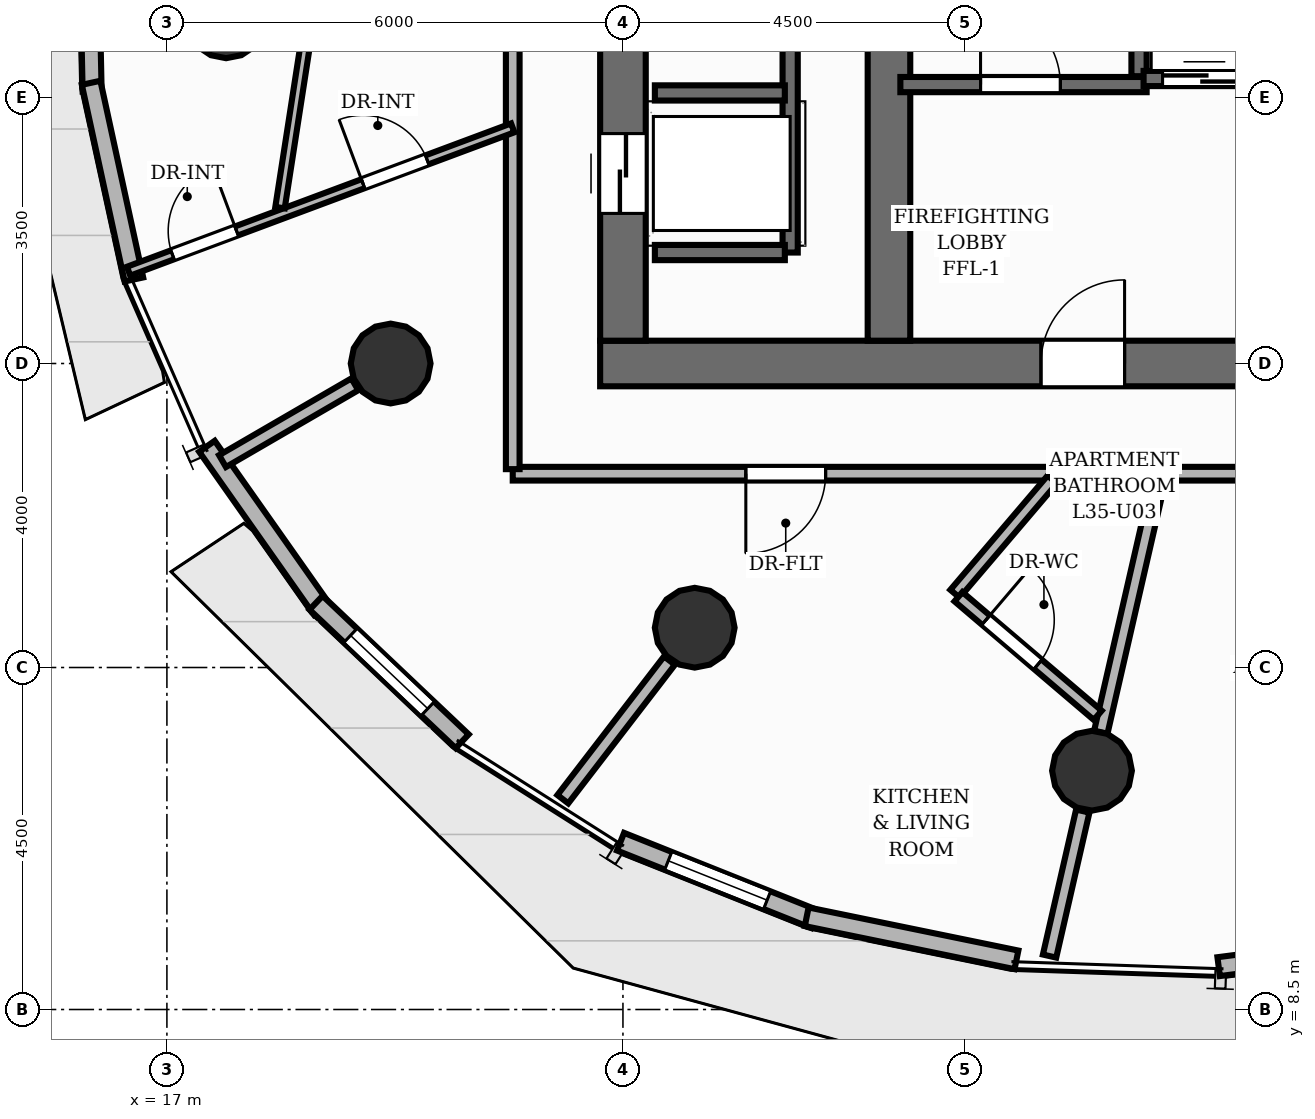
"""IFC4 building model, lengths in metres.
Left out: names, types, materials, properties, quantities, classifications, styles, units other than length and angle.
Written with IfcOpenShell. Run it as: python <this file> out.ifc"""

import sys

from ifc_helpers import new_model, si_unit, direction, frame, frame_2d, origin, origin_2d, place, context, subcontext, project, spatial, rectangle, circle, extrude, element, fill, save


model = new_model("IFC4")
c1 = context("Model", 3, precision=1e-05, world=origin(), true_north=direction((0.0, 1.0)))
c2 = subcontext(c1, "Body", "Model", "MODEL_VIEW")
j1 = project(units=[si_unit("LENGTHUNIT", "METRE"), si_unit("PLANEANGLEUNIT", "RADIAN")], contexts=[c1])
p1 = place(None, origin())
s1 = spatial("IfcSite", under=j1, at=p1, CompositionType="ELEMENT")
p2 = place(p1, origin())
s2 = spatial("IfcBuilding", under=s1, at=p2, CompositionType="ELEMENT")
p3 = place(p2, frame((0.0, 0.0, 120.16)))
s3 = spatial("IfcBuildingStorey", under=s2, at=p3, CompositionType="ELEMENT", Elevation=120.16)
p4 = place(p3, frame((22.7, 17.0, 0.0), z_axis=(0.0, 0.0, 1.0), x_axis=(1.0, 0.0, 0.0)))
e1 = element("IfcWall", 1, at=p4, inside=s3, PredefinedType="SHEAR", context=c2, shape_type="SweptSolid", body=[
    extrude(rectangle(XDim=18.6, YDim=0.6, at=frame_2d((9.3, 0.0))), origin(), (0.0, 0.0, 1.0), 3.2),
])
p5 = place(p4, frame((5.8, 0.0, 0.0)))
e2 = element("IfcOpeningElement", 2, at=p5, cuts=e1, PredefinedType="OPENING", context=c2, shape_type="SweptSolid", body=[
    extrude(rectangle(XDim=1.1, YDim=2.15, at=frame_2d((0.55, 1.075))), frame((0.0, 0.31, 0.0), z_axis=(0.0, -1.0, 0.0), x_axis=(1.0, 0.0, 0.0)), (0.0, 0.0, 1.0), 0.62),
])
p6 = place(p4, frame((9.35, 0.0, 0.0)))
e3 = element("IfcOpeningElement", 3, at=p6, cuts=e1, PredefinedType="OPENING", context=c2, shape_type="SweptSolid", body=[
    extrude(rectangle(XDim=0.9, YDim=2.1, at=frame_2d((0.45, 1.05))), frame((0.0, 0.31, 0.0), z_axis=(0.0, -1.0, 0.0), x_axis=(1.0, 0.0, 0.0)), (0.0, 0.0, 1.0), 0.62),
])
p7 = place(p3, frame((23.0, 17.3, 0.0), z_axis=(0.0, 0.0, 1.0), x_axis=(0.0, 1.0, 0.0)))
e4 = element("IfcWall", 4, at=p7, inside=s3, PredefinedType="SHEAR", context=c2, shape_type="SweptSolid", body=[
    extrude(rectangle(XDim=13.4, YDim=0.6, at=frame_2d((6.7, 0.0))), origin(), (0.0, 0.0, 1.0), 3.2),
])
p8 = place(p7, frame((1.675, 0.0, 0.0)))
e5 = element("IfcOpeningElement", 5, at=p8, cuts=e4, PredefinedType="OPENING", context=c2, shape_type="SweptSolid", body=[
    extrude(rectangle(XDim=1.05, YDim=2.15, at=frame_2d((0.525, 1.075))), frame((0.0, 0.31, 0.0), z_axis=(0.0, -1.0, 0.0), x_axis=(1.0, 0.0, 0.0)), (0.0, 0.0, 1.0), 0.62),
])
p9 = place(p7, frame((6.175, 0.0, 0.0)))
e6 = element("IfcOpeningElement", 6, at=p9, cuts=e4, PredefinedType="OPENING", context=c2, shape_type="SweptSolid", body=[
    extrude(rectangle(XDim=1.05, YDim=2.15, at=frame_2d((0.525, 1.075))), frame((0.0, 0.31, 0.0), z_axis=(0.0, -1.0, 0.0), x_axis=(1.0, 0.0, 0.0)), (0.0, 0.0, 1.0), 0.62),
])
p10 = place(p7, frame((10.675, 0.0, 0.0)))
e7 = element("IfcOpeningElement", 7, at=p10, cuts=e4, PredefinedType="OPENING", context=c2, shape_type="SweptSolid", body=[
    extrude(rectangle(XDim=1.05, YDim=2.15, at=frame_2d((0.525, 1.075))), frame((0.0, 0.31, 0.0), z_axis=(0.0, -1.0, 0.0), x_axis=(1.0, 0.0, 0.0)), (0.0, 0.0, 1.0), 0.62),
])
p11 = place(p3, frame((26.5, 17.3, 0.0), z_axis=(0.0, 0.0, 1.0), x_axis=(0.0, 1.0, 0.0)))
e8 = element("IfcWall", 8, at=p11, inside=s3, PredefinedType="SHEAR", context=c2, shape_type="SweptSolid", body=[
    extrude(rectangle(XDim=13.4, YDim=0.56, at=frame_2d((6.7, 0.0))), origin(), (0.0, 0.0, 1.0), 3.2),
])
for number, where, z_axis, x_axis in (
    (9, (17.779, 21.542, 0.0), (0.0, 0.0, 1.0), (1.0, 0.0, 0.0)),
    (10, (19.944, 17.0, 0.0), (0.0, 0.0, 1.0), (1.0, 0.0, 0.0)),
    (11, (23.944, 13.523, 0.0), (0.0, 0.0, 1.0), (1.0, 0.0, 0.0)),
    (12, (29.171, 11.642, 0.0), (0.0, 0.0, 1.0), (1.0, 0.0, 0.0)),
):
    element("IfcColumn", number, at=place(p3, frame(where, z_axis=z_axis, x_axis=x_axis)), inside=s3, PredefinedType="COLUMN", context=c2, shape_type="SweptSolid", body=[
        extrude(circle(Radius=0.525, at=origin_2d()), origin(), (0.0, 0.0, 1.0), 3.2),
    ])
p12 = place(p3, frame((16.016, 20.581, 0.0), z_axis=(0.0, 0.0, 1.0), x_axis=(-0.020851468483, 0.999782584496, 0.0)))
e13 = element("IfcWall", 13, at=p12, inside=s3, PredefinedType="SOLIDWALL", context=c2, shape_type="SweptSolid", body=[
    extrude(rectangle(XDim=2.693, YDim=0.25, at=frame_2d((1.346, 0.0))), origin(), (0.0, 0.0, 1.0), 2.96),
])
p13 = place(p3, frame((16.566, 18.106, 0.0), z_axis=(0.0, 0.0, 1.0), x_axis=(-0.212506194302, 0.977159719485, 0.0)))
e14 = element("IfcWall", 14, at=p13, inside=s3, PredefinedType="SOLIDWALL", context=c2, shape_type="SweptSolid", body=[
    extrude(rectangle(XDim=2.648, YDim=0.25, at=frame_2d((1.324, 0.0))), origin(), (0.0, 0.0, 1.0), 2.96),
])
p14 = place(p3, frame((19.038, 13.765, 0.0), z_axis=(0.0, 0.0, 1.0), x_axis=(-0.575627066149, 0.817712345949, 0.0)))
e15 = element("IfcWall", 15, at=p14, inside=s3, PredefinedType="SOLIDWALL", context=c2, shape_type="SweptSolid", body=[
    extrude(rectangle(XDim=2.624, YDim=0.25, at=frame_2d((1.312, 0.0))), origin(), (0.0, 0.0, 1.0), 2.96),
])
p15 = place(p3, frame((20.885, 12.03, 0.0), z_axis=(0.0, 0.0, 1.0), x_axis=(-0.725707968309, 0.688002866805, 0.0)))
e16 = element("IfcWall", 16, at=p15, inside=s3, PredefinedType="SOLIDWALL", context=c2, shape_type="SweptSolid", body=[
    extrude(rectangle(XDim=2.648, YDim=0.25, at=frame_2d((1.324, 0.0))), origin(), (0.0, 0.0, 1.0), 2.96),
])
p16 = place(p15, frame((0.624, 0.0, 0.85)))
e17 = element("IfcOpeningElement", 17, at=p16, cuts=e16, PredefinedType="OPENING", context=c2, shape_type="SweptSolid", body=[
    extrude(rectangle(XDim=1.4, YDim=1.55, at=frame_2d((0.7, 0.775))), frame((0.0, 0.135, 0.0), z_axis=(0.0, -1.0, 0.0), x_axis=(1.0, 0.0, 0.0)), (0.0, 0.0, 1.0), 0.27),
])
p17 = place(p3, frame((25.524, 9.688, 0.0), z_axis=(0.0, 0.0, 1.0), x_axis=(-0.928770081868, 0.370656357058, 0.0)))
e18 = element("IfcWall", 18, at=p17, inside=s3, PredefinedType="SOLIDWALL", context=c2, shape_type="SweptSolid", body=[
    extrude(rectangle(XDim=2.752, YDim=0.25, at=frame_2d((1.376, 0.0))), origin(), (0.0, 0.0, 1.0), 2.96),
])
p18 = place(p17, frame((0.676, 0.0, 0.85)))
e19 = element("IfcOpeningElement", 19, at=p18, cuts=e18, PredefinedType="OPENING", context=c2, shape_type="SweptSolid", body=[
    extrude(rectangle(XDim=1.4, YDim=1.55, at=frame_2d((0.7, 0.775))), frame((0.0, 0.135, 0.0), z_axis=(0.0, -1.0, 0.0), x_axis=(1.0, 0.0, 0.0)), (0.0, 0.0, 1.0), 0.27),
])
p19 = place(p3, frame((28.177, 9.153, 0.0), z_axis=(0.0, 0.0, 1.0), x_axis=(-0.97955106245, 0.20119571579, 0.0)))
e20 = element("IfcWall", 20, at=p19, inside=s3, PredefinedType="SOLIDWALL", context=c2, shape_type="SweptSolid", body=[
    extrude(rectangle(XDim=2.818, YDim=0.25, at=frame_2d((1.409, 0.0))), origin(), (0.0, 0.0, 1.0), 2.96),
])
p20 = place(p3, frame((33.75, 9.439, 0.0), z_axis=(0.0, 0.0, 1.0), x_axis=(-0.991825107288, -0.1276046886, 0.0)))
e21 = element("IfcWall", 21, at=p20, inside=s3, PredefinedType="SOLIDWALL", context=c2, shape_type="SweptSolid", body=[
    extrude(rectangle(XDim=2.937, YDim=0.25, at=frame_2d((1.468, 0.0))), origin(), (0.0, 0.0, 1.0), 2.96),
])
p21 = place(p3, frame((29.79, 20.78, 0.0), z_axis=(0.0, 0.0, 1.0), x_axis=(0.0, 1.0, 0.0)))
e22 = element("IfcWall", 22, at=p21, inside=s3, PredefinedType="SHEAR", context=c2, shape_type="SweptSolid", body=[
    extrude(rectangle(XDim=6.44, YDim=0.2, at=frame_2d((3.22, 0.0))), origin(), (0.0, 0.0, 1.0), 3.2),
])
p22 = place(p3, frame((26.65, 20.67, 0.0), z_axis=(0.0, 0.0, 1.0), x_axis=(1.0, 0.0, 0.0)))
e23 = element("IfcWall", 23, at=p22, inside=s3, PredefinedType="SHEAR", context=c2, shape_type="SweptSolid", body=[
    extrude(rectangle(XDim=3.24, YDim=0.2, at=frame_2d((1.62, 0.0))), origin(), (0.0, 0.0, 1.0), 3.2),
])
p23 = place(p22, frame((1.055, 0.0, 0.0)))
e24 = element("IfcOpeningElement", 24, at=p23, cuts=e23, PredefinedType="OPENING", context=c2, shape_type="SweptSolid", body=[
    extrude(rectangle(XDim=1.05, YDim=2.15, at=frame_2d((0.525, 1.075))), frame((0.0, 0.11, 0.0), z_axis=(0.0, -1.0, 0.0), x_axis=(1.0, 0.0, 0.0)), (0.0, 0.0, 1.0), 0.22),
])
p24 = place(p3, frame((29.85, 20.75, 0.0), z_axis=(0.0, 0.0, 1.0), x_axis=(1.0, 0.0, 0.0)))
e25 = element("IfcWall", 25, at=p24, inside=s3, PredefinedType="SHEAR", context=c2, shape_type="SweptSolid", body=[
    extrude(rectangle(XDim=2.3, YDim=0.2, at=frame_2d((1.15, 0.0))), origin(), (0.0, 0.0, 1.0), 3.2),
])
p25 = place(p24, frame((0.25, 0.0, 0.0)))
e26 = element("IfcOpeningElement", 26, at=p25, cuts=e25, PredefinedType="OPENING", context=c2, shape_type="SweptSolid", body=[
    extrude(rectangle(XDim=1.1, YDim=2.15, at=frame_2d((0.55, 1.075))), frame((0.0, 0.11, 0.0), z_axis=(0.0, -1.0, 0.0), x_axis=(1.0, 0.0, 0.0)), (0.0, 0.0, 1.0), 0.22),
])
p26 = place(p3, frame((25.2, 18.46, 0.0), z_axis=(0.0, 0.0, 1.0), x_axis=(0.0, 1.0, 0.0)))
e27 = element("IfcWall", 27, at=p26, inside=s3, PredefinedType="SHEAR", context=c2, shape_type="SweptSolid", body=[
    extrude(rectangle(XDim=11.08, YDim=0.2, at=frame_2d((5.54, 0.0))), origin(), (0.0, 0.0, 1.0), 3.2),
])
for number, where, z_axis, x_axis in (
    (28, (23.42, 18.46, 0.0), (0.0, 0.0, 1.0), (1.0, 0.0, 0.0)),
    (29, (23.42, 20.56, 0.0), (0.0, 0.0, 1.0), (1.0, 0.0, 0.0)),
):
    element("IfcWall", number, at=place(p3, frame(where, z_axis=z_axis, x_axis=x_axis)), inside=s3, PredefinedType="SHEAR", context=c2, shape_type="SweptSolid", body=[
        extrude(rectangle(XDim=1.71, YDim=0.2, at=frame_2d((0.855, 0.0))), origin(), (0.0, 0.0, 1.0), 3.2),
    ])
p27 = place(p3, frame((19.472, 16.726, 0.0), z_axis=(0.0, 0.0, 1.0), x_axis=(-0.864841613648, -0.502044802088, 0.0)))
e30 = element("IfcWall", 30, at=p27, inside=s3, PredefinedType="PARTITIONING", context=c2, shape_type="SweptSolid", body=[
    extrude(rectangle(XDim=2.013, YDim=0.18, at=frame_2d((1.006, 0.0))), origin(), (0.0, 0.0, 1.0), 2.336),
])
p28 = place(p3, frame((23.612, 13.092, 0.0), z_axis=(0.0, 0.0, 1.0), x_axis=(-0.609546695458, -0.792750166229, 0.0)))
e31 = element("IfcWall", 31, at=p28, inside=s3, PredefinedType="PARTITIONING", context=c2, shape_type="SweptSolid", body=[
    extrude(rectangle(XDim=2.302, YDim=0.18, at=frame_2d((1.151, 0.0))), origin(), (0.0, 0.0, 1.0), 2.336),
])
p29 = place(p3, frame((29.05, 11.111, 0.0), z_axis=(0.0, 0.0, 1.0), x_axis=(-0.22314653936, -0.97478491062, 0.0)))
e32 = element("IfcWall", 32, at=p29, inside=s3, PredefinedType="PARTITIONING", context=c2, shape_type="SweptSolid", body=[
    extrude(rectangle(XDim=1.957, YDim=0.18, at=frame_2d((0.979, 0.0))), origin(), (0.0, 0.0, 1.0), 2.336),
])
p30 = place(p3, frame((42.45, 15.55, 0.0), z_axis=(0.0, 0.0, 1.0), x_axis=(-1.0, 0.0, 0.0)))
e33 = element("IfcWall", 33, at=p30, inside=s3, PredefinedType="PARTITIONING", context=c2, shape_type="SweptSolid", body=[
    extrude(rectangle(XDim=13.76, YDim=0.18, at=frame_2d((6.88, 0.0))), origin(), (0.0, 0.0, 1.0), 2.955),
])
p31 = place(p30, frame((5.677, 0.0, 0.0)))
e34 = element("IfcOpeningElement", 34, at=p31, cuts=e33, PredefinedType="OPENING", context=c2, shape_type="SweptSolid", body=[
    extrude(rectangle(XDim=1.05, YDim=2.15, at=frame_2d((0.525, 1.075))), frame((0.0, 0.1, 0.0), z_axis=(0.0, -1.0, 0.0), x_axis=(1.0, 0.0, 0.0)), (0.0, 0.0, 1.0), 0.2),
])
p32 = place(p3, frame((28.733, 15.55, 0.0), z_axis=(0.0, 0.0, 1.0), x_axis=(-1.0, 0.0, 0.0)))
e35 = element("IfcWall", 35, at=p32, inside=s3, PredefinedType="PARTITIONING", context=c2, shape_type="SweptSolid", body=[
    extrude(rectangle(XDim=7.183, YDim=0.18, at=frame_2d((3.592, 0.0))), origin(), (0.0, 0.0, 1.0), 2.955),
])
p33 = place(p32, frame((3.067, 0.0, 0.0)))
e36 = element("IfcOpeningElement", 36, at=p33, cuts=e35, PredefinedType="OPENING", context=c2, shape_type="SweptSolid", body=[
    extrude(rectangle(XDim=1.05, YDim=2.15, at=frame_2d((0.525, 1.075))), frame((0.0, 0.1, 0.0), z_axis=(0.0, -1.0, 0.0), x_axis=(1.0, 0.0, 0.0)), (0.0, 0.0, 1.0), 0.2),
])
p34 = place(p3, frame((21.55, 15.61, 0.0), z_axis=(0.0, 0.0, 1.0), x_axis=(0.0, 1.0, 0.0)))
e37 = element("IfcWall", 37, at=p34, inside=s3, PredefinedType="PARTITIONING", context=c2, shape_type="SweptSolid", body=[
    extrude(rectangle(XDim=16.84, YDim=0.18, at=frame_2d((8.42, 0.0))), origin(), (0.0, 0.0, 1.0), 2.955),
])
p35 = place(p3, frame((29.287, 12.149, 0.0), z_axis=(0.0, 0.0, 1.0), x_axis=(0.223423247062, 0.974721525705, 0.0)))
e38 = element("IfcWall", 38, at=p35, inside=s3, PredefinedType="PARTITIONING", context=c2, shape_type="SweptSolid", body=[
    extrude(rectangle(XDim=3.489, YDim=0.18, at=frame_2d((1.745, 0.0))), origin(), (0.0, 0.0, 1.0), 2.336),
])
p36 = place(p3, frame((28.649, 15.474, 0.0), z_axis=(0.0, 0.0, 1.0), x_axis=(-0.64821168269, -0.761460185712, 0.0)))
e39 = element("IfcWall", 39, at=p36, inside=s3, PredefinedType="PLUMBINGWALL", context=c2, shape_type="SweptSolid", body=[
    extrude(rectangle(XDim=1.975, YDim=0.16, at=frame_2d((0.987, 0.0))), origin(), (0.0, 0.0, 1.0), 2.692),
])
p37 = place(p3, frame((27.414, 13.931, 0.0), z_axis=(0.0, 0.0, 1.0), x_axis=(0.761436059215, -0.648240023237, 0.0)))
e40 = element("IfcWall", 40, at=p37, inside=s3, PredefinedType="PLUMBINGWALL", context=c2, shape_type="SweptSolid", body=[
    extrude(rectangle(XDim=2.407, YDim=0.16, at=frame_2d((1.204, 0.0))), origin(), (0.0, 0.0, 1.0), 2.955),
])
p38 = place(p37, frame((0.473, 0.0, 0.0)))
e41 = element("IfcOpeningElement", 41, at=p38, cuts=e40, PredefinedType="OPENING", context=c2, shape_type="SweptSolid", body=[
    extrude(rectangle(XDim=0.9, YDim=2.1, at=frame_2d((0.45, 1.05))), frame((0.0, 0.09, 0.0), z_axis=(0.0, -1.0, 0.0), x_axis=(1.0, 0.0, 0.0)), (0.0, 0.0, 1.0), 0.18),
])
p39 = place(p3, frame((16.496, 18.214, 0.0), z_axis=(0.0, 0.0, 1.0), x_axis=(0.936891530049, 0.349620166641, 0.0)))
e42 = element("IfcWall", 42, at=p39, inside=s3, PredefinedType="PARTITIONING", context=c2, shape_type="SweptSolid", body=[
    extrude(rectangle(XDim=5.394, YDim=0.125, at=frame_2d((2.697, 0.0))), origin(), (0.0, 0.0, 1.0), 2.955),
])
p40 = place(p39, frame((0.616, 0.0, 0.0)))
e43 = element("IfcOpeningElement", 43, at=p40, cuts=e42, PredefinedType="OPENING", context=c2, shape_type="SweptSolid", body=[
    extrude(rectangle(XDim=0.9, YDim=2.1, at=frame_2d((0.45, 1.05))), frame((0.0, 0.073, 0.0), z_axis=(0.0, -1.0, 0.0), x_axis=(1.0, 0.0, 0.0)), (0.0, 0.0, 1.0), 0.145),
])
p41 = place(p39, frame((3.292, 0.0, 0.0)))
e44 = element("IfcOpeningElement", 44, at=p41, cuts=e42, PredefinedType="OPENING", context=c2, shape_type="SweptSolid", body=[
    extrude(rectangle(XDim=0.9, YDim=2.1, at=frame_2d((0.45, 1.05))), frame((0.0, 0.073, 0.0), z_axis=(0.0, -1.0, 0.0), x_axis=(1.0, 0.0, 0.0)), (0.0, 0.0, 1.0), 0.145),
])
p42 = place(p3, frame((20.278, 30.583, 0.0), z_axis=(0.0, 0.0, 1.0), x_axis=(-0.153357052545, -0.988170842737, 0.0)))
e45 = element("IfcWall", 45, at=p42, inside=s3, PredefinedType="PARTITIONING", context=c2, shape_type="SweptSolid", body=[
    extrude(rectangle(XDim=11.671, YDim=0.125, at=frame_2d((5.835, 0.0))), origin(), (0.0, 0.0, 1.0), 2.955),
])
p43 = place(p16, origin())
e46 = element("IfcWindow", 46, at=p43, inside=s3, PartitioningType="SINGLE_PANEL", PredefinedType="WINDOW", context=c2, shape_type="SweptSolid", body=[
    extrude(rectangle(XDim=1.4, YDim=1.55, at=frame_2d((0.7, 0.775))), frame((0.0, 0.03, 0.0), z_axis=(0.0, -1.0, 0.0), x_axis=(1.0, 0.0, 0.0)), (0.0, 0.0, 1.0), 0.06),
])
fill(e17, e46)
p44 = place(p18, origin())
e47 = element("IfcWindow", 47, at=p44, inside=s3, PartitioningType="SINGLE_PANEL", PredefinedType="WINDOW", context=c2, shape_type="SweptSolid", body=[
    extrude(rectangle(XDim=1.4, YDim=1.55, at=frame_2d((0.7, 0.775))), frame((0.0, 0.03, 0.0), z_axis=(0.0, -1.0, 0.0), x_axis=(1.0, 0.0, 0.0)), (0.0, 0.0, 1.0), 0.06),
])
fill(e19, e47)
p45 = place(p23, origin())
e48 = element("IfcDoor", 48, at=p45, inside=s3, OperationType="SINGLE_SWING_LEFT", PredefinedType="DOOR", context=c2, shape_type="SweptSolid", body=[
    extrude(rectangle(XDim=1.05, YDim=2.15, at=frame_2d((0.525, 1.075))), frame((0.0, 0.025, 0.0), z_axis=(0.0, -1.0, 0.0), x_axis=(1.0, 0.0, 0.0)), (0.0, 0.0, 1.0), 0.05),
])
fill(e24, e48)
p46 = place(p5, origin())
e49 = element("IfcDoor", 49, at=p46, inside=s3, OperationType="SINGLE_SWING_RIGHT", PredefinedType="DOOR", context=c2, shape_type="SweptSolid", body=[
    extrude(rectangle(XDim=1.1, YDim=2.15, at=frame_2d((0.55, 1.075))), frame((0.0, 0.025, 0.0), z_axis=(0.0, -1.0, 0.0), x_axis=(1.0, 0.0, 0.0)), (0.0, 0.0, 1.0), 0.05),
])
fill(e2, e49)
p47 = place(p25, origin())
e50 = element("IfcDoor", 50, at=p47, inside=s3, OperationType="DOUBLE_DOOR_SLIDING", PredefinedType="DOOR", context=c2, shape_type="SweptSolid", body=[
    extrude(rectangle(XDim=1.1, YDim=2.15, at=frame_2d((0.55, 1.075))), frame((0.0, 0.025, 0.0), z_axis=(0.0, -1.0, 0.0), x_axis=(1.0, 0.0, 0.0)), (0.0, 0.0, 1.0), 0.05),
])
fill(e26, e50)
p48 = place(p8, origin())
e51 = element("IfcDoor", 51, at=p48, inside=s3, OperationType="DOUBLE_DOOR_SLIDING", PredefinedType="DOOR", context=c2, shape_type="SweptSolid", body=[
    extrude(rectangle(XDim=1.05, YDim=2.15, at=frame_2d((0.525, 1.075))), frame((0.0, 0.025, 0.0), z_axis=(0.0, -1.0, 0.0), x_axis=(1.0, 0.0, 0.0)), (0.0, 0.0, 1.0), 0.05),
])
fill(e5, e51)
p49 = place(p33, origin())
e52 = element("IfcDoor", 52, at=p49, inside=s3, OperationType="SINGLE_SWING_RIGHT", PredefinedType="DOOR", context=c2, shape_type="SweptSolid", body=[
    extrude(rectangle(XDim=1.05, YDim=2.15, at=frame_2d((0.525, 1.075))), frame((0.0, 0.025, 0.0), z_axis=(0.0, -1.0, 0.0), x_axis=(1.0, 0.0, 0.0)), (0.0, 0.0, 1.0), 0.05),
])
fill(e36, e52)
p50 = place(p38, origin())
e53 = element("IfcDoor", 53, at=p50, inside=s3, OperationType="SINGLE_SWING_LEFT", PredefinedType="DOOR", context=c2, shape_type="SweptSolid", body=[
    extrude(rectangle(XDim=0.9, YDim=2.1, at=frame_2d((0.45, 1.05))), frame((0.0, 0.025, 0.0), z_axis=(0.0, -1.0, 0.0), x_axis=(1.0, 0.0, 0.0)), (0.0, 0.0, 1.0), 0.05),
])
fill(e41, e53)
p51 = place(p40, origin())
e54 = element("IfcDoor", 54, at=p51, inside=s3, OperationType="SINGLE_SWING_RIGHT", PredefinedType="DOOR", context=c2, shape_type="SweptSolid", body=[
    extrude(rectangle(XDim=0.9, YDim=2.1, at=frame_2d((0.45, 1.05))), frame((0.0, 0.025, 0.0), z_axis=(0.0, -1.0, 0.0), x_axis=(1.0, 0.0, 0.0)), (0.0, 0.0, 1.0), 0.05),
])
fill(e43, e54)
p52 = place(p41, origin())
e55 = element("IfcDoor", 55, at=p52, inside=s3, OperationType="SINGLE_SWING_LEFT", PredefinedType="DOOR", context=c2, shape_type="SweptSolid", body=[
    extrude(rectangle(XDim=0.9, YDim=2.1, at=frame_2d((0.45, 1.05))), frame((0.0, 0.025, 0.0), z_axis=(0.0, -1.0, 0.0), x_axis=(1.0, 0.0, 0.0)), (0.0, 0.0, 1.0), 0.05),
])
fill(e44, e55)
save(model, sys.argv[1])
